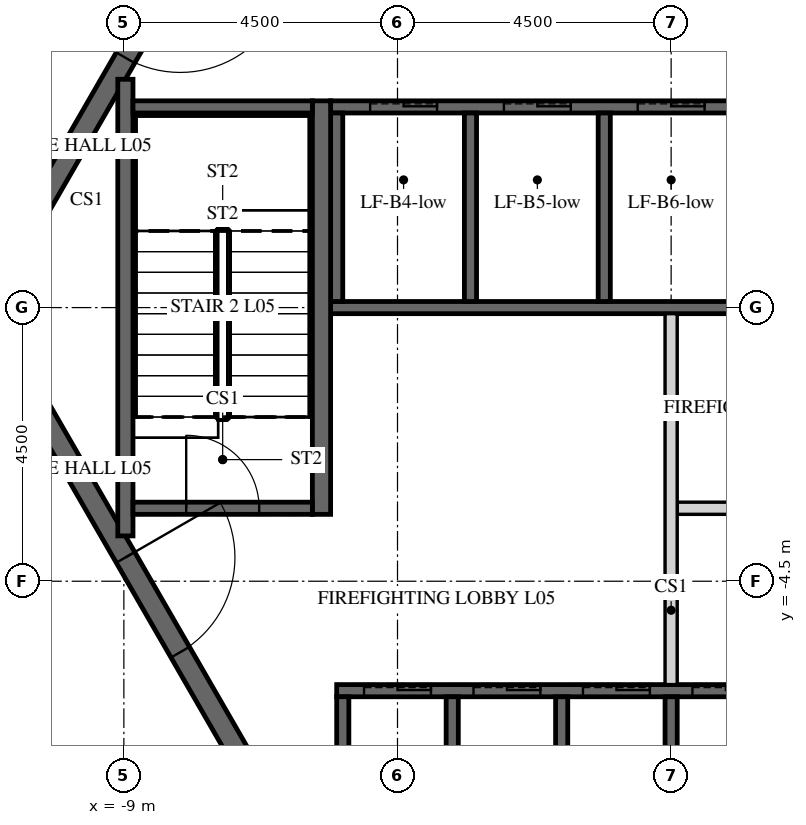
"""IFC4 building model, lengths in metres.
Left out: names, types, materials, properties, quantities, classifications, styles, units other than length and angle.
Written with IfcOpenShell. Run it as: python <this file> out.ifc"""

import sys

from ifc_helpers import new_model, si_unit, direction, frame, frame_2d, origin, place, context, subcontext, project, spatial, polyline, rectangle, outline, extrude, element, fill, save


model = new_model("IFC4")
c1 = context("Model", 3, precision=1e-05, world=origin(), true_north=direction((0.0, 1.0)))
c2 = subcontext(c1, "Body", "Model", "MODEL_VIEW")
j1 = project(units=[si_unit("LENGTHUNIT", "METRE"), si_unit("PLANEANGLEUNIT", "RADIAN")], contexts=[c1])
p1 = place(None, origin())
s1 = spatial("IfcSite", under=j1, at=p1, CompositionType="ELEMENT")
p2 = place(p1, origin())
s2 = spatial("IfcBuilding", under=s1, at=p2, CompositionType="ELEMENT")
p3 = place(p2, frame((0.0, 0.0, 31.5)))
s3 = spatial("IfcBuildingStorey", under=s2, at=p3, CompositionType="ELEMENT", Elevation=31.5)
p4 = place(p3, frame((-7.91, 13.7, -0.3), z_axis=(0.0, 0.0, 1.0), x_axis=(-0.499999880136, -0.866025472988, 0.0)))
e1 = element("IfcWall", 1, at=p4, inside=s3, PredefinedType="SHEAR", context=c2, shape_type="SweptSolid", body=[
    extrude(outline(polyline([(-0.173, -0.3), (15.993, -0.3), (15.646, 0.3), (0.173, 0.3), (-0.173, -0.3)])), origin(), (0.0, 0.0, 1.0), 6.15),
])
p5 = place(p4, frame((7.039, 0.0, 0.3)))
e2 = element("IfcOpeningElement", 2, at=p5, cuts=e1, PredefinedType="OPENING", context=c2, shape_type="SweptSolid", body=[
    extrude(rectangle(XDim=1.8, YDim=2.4, at=frame_2d((0.9, 1.2))), frame((0.0, 0.31, 0.0), z_axis=(0.0, -1.0, 0.0), x_axis=(1.0, 0.0, 0.0)), (0.0, 0.0, 1.0), 0.62),
])
p6 = place(p3, frame((-15.819, 0.0, -0.3), z_axis=(0.0, 0.0, 1.0), x_axis=(0.499999880136, -0.866025472988, 0.0)))
e3 = element("IfcWall", 3, at=p6, inside=s3, PredefinedType="SHEAR", context=c2, shape_type="SweptSolid", body=[
    extrude(outline(polyline([(-0.173, -0.3), (15.993, -0.3), (15.646, 0.3), (0.173, 0.3), (-0.173, -0.3)])), origin(), (0.0, 0.0, 1.0), 6.15),
])
p7 = place(p6, frame((6.981, 0.0, 0.3)))
e4 = element("IfcOpeningElement", 4, at=p7, cuts=e3, PredefinedType="OPENING", context=c2, shape_type="SweptSolid", body=[
    extrude(rectangle(XDim=1.8, YDim=2.4, at=frame_2d((0.9, 1.2))), frame((0.0, 0.31, 0.0), z_axis=(0.0, -1.0, 0.0), x_axis=(1.0, 0.0, 0.0)), (0.0, 0.0, 1.0), 0.62),
])
p8 = place(p3, frame((-5.673, 9.825, -0.3), z_axis=(0.0, 0.0, 1.0), x_axis=(-0.499995046907, -0.866028263435, 0.0)))
e5 = element("IfcWall", 5, at=p8, inside=s3, PredefinedType="SHEAR", context=c2, shape_type="SweptSolid", body=[
    extrude(outline(polyline([(-0.101, -0.175), (11.446, -0.175), (11.244, 0.175), (0.101, 0.175), (-0.101, -0.175)])), origin(), (0.0, 0.0, 1.0), 6.15),
])
p9 = place(p8, frame((4.801, 0.0, 0.3)))
e6 = element("IfcOpeningElement", 6, at=p9, cuts=e5, PredefinedType="OPENING", context=c2, shape_type="SweptSolid", body=[
    extrude(rectangle(XDim=1.8, YDim=2.4, at=frame_2d((0.9, 1.2))), frame((0.0, 0.185, 0.0), z_axis=(0.0, -1.0, 0.0), x_axis=(1.0, 0.0, 0.0)), (0.0, 0.0, 1.0), 0.37),
])
p10 = place(p3, frame((-11.345, 0.0, -0.3), z_axis=(0.0, 0.0, 1.0), x_axis=(0.499995046907, -0.866028263435, 0.0)))
e7 = element("IfcWall", 7, at=p10, inside=s3, PredefinedType="SHEAR", context=c2, shape_type="SweptSolid", body=[
    extrude(outline(polyline([(-0.101, -0.175), (11.446, -0.175), (11.244, 0.175), (0.101, 0.175), (-0.101, -0.175)])), origin(), (0.0, 0.0, 1.0), 6.15),
])
p11 = place(p10, frame((4.744, 0.0, 0.3)))
e8 = element("IfcOpeningElement", 8, at=p11, cuts=e7, PredefinedType="OPENING", context=c2, shape_type="SweptSolid", body=[
    extrude(rectangle(XDim=1.8, YDim=2.4, at=frame_2d((0.9, 1.2))), frame((0.0, 0.185, 0.0), z_axis=(0.0, -1.0, 0.0), x_axis=(1.0, 0.0, 0.0)), (0.0, 0.0, 1.0), 0.37),
])
p12 = place(p3, frame((-5.6, 3.3, -0.25), z_axis=(0.0, 0.0, 1.0), x_axis=(1.0, 0.0, 0.0)))
e9 = element("IfcWall", 9, at=p12, inside=s3, PredefinedType="SHEAR", context=c2, shape_type="SweptSolid", body=[
    extrude(rectangle(XDim=11.2, YDim=0.2, at=frame_2d((5.6, 0.0))), origin(), (0.0, 0.0, 1.0), 6.0),
])
p13 = place(p12, frame((0.65, 0.0, 0.25)))
e10 = element("IfcOpeningElement", 10, at=p13, cuts=e9, PredefinedType="OPENING", context=c2, shape_type="SweptSolid", body=[
    extrude(rectangle(XDim=1.1, YDim=2.1, at=frame_2d((0.55, 1.05))), frame((0.0, 0.11, 0.0), z_axis=(0.0, -1.0, 0.0), x_axis=(1.0, 0.0, 0.0)), (0.0, 0.0, 1.0), 0.22),
])
p14 = place(p12, frame((2.85, 0.0, 0.25)))
e11 = element("IfcOpeningElement", 11, at=p14, cuts=e9, PredefinedType="OPENING", context=c2, shape_type="SweptSolid", body=[
    extrude(rectangle(XDim=1.1, YDim=2.1, at=frame_2d((0.55, 1.05))), frame((0.0, 0.11, 0.0), z_axis=(0.0, -1.0, 0.0), x_axis=(1.0, 0.0, 0.0)), (0.0, 0.0, 1.0), 0.22),
])
p15 = place(p12, frame((5.05, 0.0, 0.25)))
e12 = element("IfcOpeningElement", 12, at=p15, cuts=e9, PredefinedType="OPENING", context=c2, shape_type="SweptSolid", body=[
    extrude(rectangle(XDim=1.1, YDim=2.1, at=frame_2d((0.55, 1.05))), frame((0.0, 0.11, 0.0), z_axis=(0.0, -1.0, 0.0), x_axis=(1.0, 0.0, 0.0)), (0.0, 0.0, 1.0), 0.22),
])
p16 = place(p12, frame((7.25, 0.0, 0.25)))
e13 = element("IfcOpeningElement", 13, at=p16, cuts=e9, PredefinedType="OPENING", context=c2, shape_type="SweptSolid", body=[
    extrude(rectangle(XDim=1.1, YDim=2.1, at=frame_2d((0.55, 1.05))), frame((0.0, 0.11, 0.0), z_axis=(0.0, -1.0, 0.0), x_axis=(1.0, 0.0, 0.0)), (0.0, 0.0, 1.0), 0.22),
])
p17 = place(p12, frame((9.45, 0.0, 0.25)))
e14 = element("IfcOpeningElement", 14, at=p17, cuts=e9, PredefinedType="OPENING", context=c2, shape_type="SweptSolid", body=[
    extrude(rectangle(XDim=1.1, YDim=2.1, at=frame_2d((0.55, 1.05))), frame((0.0, 0.11, 0.0), z_axis=(0.0, -1.0, 0.0), x_axis=(1.0, 0.0, 0.0)), (0.0, 0.0, 1.0), 0.22),
])
p18 = place(p3, frame((-5.6, 0.0, -0.25), z_axis=(0.0, 0.0, 1.0), x_axis=(1.0, 0.0, 0.0)))
e15 = element("IfcWall", 15, at=p18, inside=s3, PredefinedType="SHEAR", context=c2, shape_type="SweptSolid", body=[
    extrude(rectangle(XDim=11.2, YDim=0.2, at=frame_2d((5.6, 0.0))), origin(), (0.0, 0.0, 1.0), 6.0),
])
for number, where, z_axis, x_axis in (
    (16, (-5.5, 0.1, -0.25), (0.0, 0.0, 1.0), (0.0, 1.0, 0.0)),
    (17, (-3.3, 0.1, -0.25), (0.0, 0.0, 1.0), (0.0, 1.0, 0.0)),
    (18, (-1.1, 0.1, -0.25), (0.0, 0.0, 1.0), (0.0, 1.0, 0.0)),
):
    element("IfcWall", number, at=place(p3, frame(where, z_axis=z_axis, x_axis=x_axis)), inside=s3, PredefinedType="SHEAR", context=c2, shape_type="SweptSolid", body=[
        extrude(rectangle(XDim=3.1, YDim=0.2, at=frame_2d((1.55, 0.0))), origin(), (0.0, 0.0, 1.0), 6.0),
    ])
p19 = place(p3, frame((-5.5, -6.3, -0.25), z_axis=(0.0, 0.0, 1.0), x_axis=(1.0, 0.0, 0.0)))
e19 = element("IfcWall", 19, at=p19, inside=s3, PredefinedType="SHEAR", context=c2, shape_type="SweptSolid", body=[
    extrude(rectangle(XDim=9.2, YDim=0.2, at=frame_2d((4.6, 0.0))), origin(), (0.0, 0.0, 1.0), 6.0),
])
p20 = place(p19, frame((0.45, 0.0, 0.25)))
e20 = element("IfcOpeningElement", 20, at=p20, cuts=e19, PredefinedType="OPENING", context=c2, shape_type="SweptSolid", body=[
    extrude(rectangle(XDim=1.1, YDim=2.1, at=frame_2d((0.55, 1.05))), frame((0.0, 0.11, 0.0), z_axis=(0.0, -1.0, 0.0), x_axis=(1.0, 0.0, 0.0)), (0.0, 0.0, 1.0), 0.22),
])
p21 = place(p19, frame((2.25, 0.0, 0.25)))
e21 = element("IfcOpeningElement", 21, at=p21, cuts=e19, PredefinedType="OPENING", context=c2, shape_type="SweptSolid", body=[
    extrude(rectangle(XDim=1.1, YDim=2.1, at=frame_2d((0.55, 1.05))), frame((0.0, 0.11, 0.0), z_axis=(0.0, -1.0, 0.0), x_axis=(1.0, 0.0, 0.0)), (0.0, 0.0, 1.0), 0.22),
])
p22 = place(p19, frame((4.05, 0.0, 0.25)))
e22 = element("IfcOpeningElement", 22, at=p22, cuts=e19, PredefinedType="OPENING", context=c2, shape_type="SweptSolid", body=[
    extrude(rectangle(XDim=1.1, YDim=2.1, at=frame_2d((0.55, 1.05))), frame((0.0, 0.11, 0.0), z_axis=(0.0, -1.0, 0.0), x_axis=(1.0, 0.0, 0.0)), (0.0, 0.0, 1.0), 0.22),
])
p23 = place(p19, frame((5.85, 0.0, 0.25)))
e23 = element("IfcOpeningElement", 23, at=p23, cuts=e19, PredefinedType="OPENING", context=c2, shape_type="SweptSolid", body=[
    extrude(rectangle(XDim=1.1, YDim=2.1, at=frame_2d((0.55, 1.05))), frame((0.0, 0.11, 0.0), z_axis=(0.0, -1.0, 0.0), x_axis=(1.0, 0.0, 0.0)), (0.0, 0.0, 1.0), 0.22),
])
p24 = place(p19, frame((7.65, 0.0, 0.25)))
e24 = element("IfcOpeningElement", 24, at=p24, cuts=e19, PredefinedType="OPENING", context=c2, shape_type="SweptSolid", body=[
    extrude(rectangle(XDim=1.1, YDim=2.1, at=frame_2d((0.55, 1.05))), frame((0.0, 0.11, 0.0), z_axis=(0.0, -1.0, 0.0), x_axis=(1.0, 0.0, 0.0)), (0.0, 0.0, 1.0), 0.22),
])
for number, where, z_axis, x_axis in (
    (25, (-5.4, -9.3, -0.25), (0.0, 0.0, 1.0), (0.0, 1.0, 0.0)),
    (26, (-3.6, -9.3, -0.25), (0.0, 0.0, 1.0), (0.0, 1.0, 0.0)),
    (27, (-1.8, -9.3, -0.25), (0.0, 0.0, 1.0), (0.0, 1.0, 0.0)),
    (28, (0.0, -9.3, -0.25), (0.0, 0.0, 1.0), (0.0, 1.0, 0.0)),
):
    element("IfcWall", number, at=place(p3, frame(where, z_axis=z_axis, x_axis=x_axis)), inside=s3, PredefinedType="SHEAR", context=c2, shape_type="SweptSolid", body=[
        extrude(rectangle(XDim=2.9, YDim=0.2, at=frame_2d((1.45, 0.0))), origin(), (0.0, 0.0, 1.0), 6.0),
    ])
p25 = place(p3, frame((0.1, -3.3, 0.0), z_axis=(0.0, 0.0, 1.0), x_axis=(1.0, 0.0, 0.0)))
e29 = element("IfcWall", 29, at=p25, inside=s3, PredefinedType="PARTITIONING", context=c2, shape_type="SweptSolid", body=[
    extrude(rectangle(XDim=5.5, YDim=0.2, at=frame_2d((2.75, 0.0))), origin(), (0.0, 0.0, 1.0), 5.75),
])
p26 = place(p25, frame((2.3, 0.0, 0.0)))
e30 = element("IfcOpeningElement", 30, at=p26, cuts=e29, PredefinedType="OPENING", context=c2, shape_type="SweptSolid", body=[
    extrude(rectangle(XDim=0.9, YDim=2.1, at=frame_2d((0.45, 1.05))), frame((0.0, 0.11, 0.0), z_axis=(0.0, -1.0, 0.0), x_axis=(1.0, 0.0, 0.0)), (0.0, 0.0, 1.0), 0.22),
])
p27 = place(p3, frame((0.0, -6.2, 0.0), z_axis=(0.0, 0.0, 1.0), x_axis=(0.0, 1.0, 0.0)))
e31 = element("IfcWall", 31, at=p27, inside=s3, PredefinedType="PARTITIONING", context=c2, shape_type="SweptSolid", body=[
    extrude(rectangle(XDim=6.1, YDim=0.2, at=frame_2d((3.05, 0.0))), origin(), (0.0, 0.0, 1.0), 5.75),
])
p28 = place(p3, frame((-5.75, -3.4, -0.25), z_axis=(0.0, 0.0, 1.0), x_axis=(0.0, 1.0, 0.0)))
e32 = element("IfcWall", 32, at=p28, inside=s3, PredefinedType="SHEAR", context=c2, shape_type="SweptSolid", body=[
    extrude(rectangle(XDim=6.8, YDim=0.3, at=frame_2d((3.4, 0.0))), origin(), (0.0, 0.0, 1.0), 6.0),
])
p29 = place(p3, frame((-8.975, -3.755, -0.25), z_axis=(0.0, 0.0, 1.0), x_axis=(0.0, 1.0, 0.0)))
e33 = element("IfcWall", 33, at=p29, inside=s3, PredefinedType="SHEAR", context=c2, shape_type="SweptSolid", body=[
    extrude(rectangle(XDim=7.51, YDim=0.25, at=frame_2d((3.755, 0.0))), origin(), (0.0, 0.0, 1.0), 6.0),
])
p30 = place(p3, frame((-8.85, 3.3, -0.25), z_axis=(0.0, 0.0, 1.0), x_axis=(1.0, 0.0, 0.0)))
e34 = element("IfcWall", 34, at=p30, inside=s3, PredefinedType="SHEAR", context=c2, shape_type="SweptSolid", body=[
    extrude(rectangle(XDim=2.95, YDim=0.2, at=frame_2d((1.475, 0.0))), origin(), (0.0, 0.0, 1.0), 6.0),
])
p31 = place(p3, frame((-8.85, -3.3, -0.25), z_axis=(0.0, 0.0, 1.0), x_axis=(1.0, 0.0, 0.0)))
e35 = element("IfcWall", 35, at=p31, inside=s3, PredefinedType="SHEAR", context=c2, shape_type="SweptSolid", body=[
    extrude(rectangle(XDim=2.95, YDim=0.2, at=frame_2d((1.475, 0.0))), origin(), (0.0, 0.0, 1.0), 6.0),
])
p32 = place(p31, frame((0.875, 0.0, 0.25)))
e36 = element("IfcOpeningElement", 36, at=p32, cuts=e35, PredefinedType="OPENING", context=c2, shape_type="SweptSolid", body=[
    extrude(rectangle(XDim=1.2, YDim=2.4, at=frame_2d((0.6, 1.2))), frame((0.0, 0.11, 0.0), z_axis=(0.0, -1.0, 0.0), x_axis=(1.0, 0.0, 0.0)), (0.0, 0.0, 1.0), 0.22),
])
p33 = place(p9, origin())
e37 = element("IfcDoor", 37, at=p33, inside=s3, OperationType="DOUBLE_DOOR_SINGLE_SWING", PredefinedType="DOOR", context=c2, shape_type="SweptSolid", body=[
    extrude(rectangle(XDim=1.8, YDim=2.4, at=frame_2d((0.9, 1.2))), frame((0.0, 0.025, 0.0), z_axis=(0.0, -1.0, 0.0), x_axis=(1.0, 0.0, 0.0)), (0.0, 0.0, 1.0), 0.05),
])
fill(e6, e37)
p34 = place(p11, origin())
e38 = element("IfcDoor", 38, at=p34, inside=s3, OperationType="DOUBLE_DOOR_SINGLE_SWING", PredefinedType="DOOR", context=c2, shape_type="SweptSolid", body=[
    extrude(rectangle(XDim=1.8, YDim=2.4, at=frame_2d((0.9, 1.2))), frame((0.0, 0.025, 0.0), z_axis=(0.0, -1.0, 0.0), x_axis=(1.0, 0.0, 0.0)), (0.0, 0.0, 1.0), 0.05),
])
fill(e8, e38)
p35 = place(p32, origin())
e39 = element("IfcDoor", 39, at=p35, inside=s3, OperationType="SINGLE_SWING_LEFT", PredefinedType="DOOR", context=c2, shape_type="SweptSolid", body=[
    extrude(rectangle(XDim=1.2, YDim=2.4, at=frame_2d((0.6, 1.2))), frame((0.0, 0.025, 0.0), z_axis=(0.0, -1.0, 0.0), x_axis=(1.0, 0.0, 0.0)), (0.0, 0.0, 1.0), 0.05),
])
fill(e36, e39)
p36 = place(p13, origin())
e40 = element("IfcDoor", 40, at=p36, inside=s3, OperationType="SLIDING_TO_LEFT", PredefinedType="DOOR", context=c2, shape_type="SweptSolid", body=[
    extrude(rectangle(XDim=1.1, YDim=2.1, at=frame_2d((0.55, 1.05))), frame((0.0, 0.025, 0.0), z_axis=(0.0, -1.0, 0.0), x_axis=(1.0, 0.0, 0.0)), (0.0, 0.0, 1.0), 0.05),
])
fill(e10, e40)
p37 = place(p14, origin())
e41 = element("IfcDoor", 41, at=p37, inside=s3, OperationType="SLIDING_TO_LEFT", PredefinedType="DOOR", context=c2, shape_type="SweptSolid", body=[
    extrude(rectangle(XDim=1.1, YDim=2.1, at=frame_2d((0.55, 1.05))), frame((0.0, 0.025, 0.0), z_axis=(0.0, -1.0, 0.0), x_axis=(1.0, 0.0, 0.0)), (0.0, 0.0, 1.0), 0.05),
])
fill(e11, e41)
p38 = place(p15, origin())
e42 = element("IfcDoor", 42, at=p38, inside=s3, OperationType="SLIDING_TO_LEFT", PredefinedType="DOOR", context=c2, shape_type="SweptSolid", body=[
    extrude(rectangle(XDim=1.1, YDim=2.1, at=frame_2d((0.55, 1.05))), frame((0.0, 0.025, 0.0), z_axis=(0.0, -1.0, 0.0), x_axis=(1.0, 0.0, 0.0)), (0.0, 0.0, 1.0), 0.05),
])
fill(e12, e42)
p39 = place(p20, origin())
e43 = element("IfcDoor", 43, at=p39, inside=s3, OperationType="SLIDING_TO_LEFT", PredefinedType="DOOR", context=c2, shape_type="SweptSolid", body=[
    extrude(rectangle(XDim=1.1, YDim=2.1, at=frame_2d((0.55, 1.05))), frame((0.0, 0.025, 0.0), z_axis=(0.0, -1.0, 0.0), x_axis=(1.0, 0.0, 0.0)), (0.0, 0.0, 1.0), 0.05),
])
fill(e20, e43)
p40 = place(p21, origin())
e44 = element("IfcDoor", 44, at=p40, inside=s3, OperationType="SLIDING_TO_LEFT", PredefinedType="DOOR", context=c2, shape_type="SweptSolid", body=[
    extrude(rectangle(XDim=1.1, YDim=2.1, at=frame_2d((0.55, 1.05))), frame((0.0, 0.025, 0.0), z_axis=(0.0, -1.0, 0.0), x_axis=(1.0, 0.0, 0.0)), (0.0, 0.0, 1.0), 0.05),
])
fill(e21, e44)
p41 = place(p22, origin())
e45 = element("IfcDoor", 45, at=p41, inside=s3, OperationType="SLIDING_TO_LEFT", PredefinedType="DOOR", context=c2, shape_type="SweptSolid", body=[
    extrude(rectangle(XDim=1.1, YDim=2.1, at=frame_2d((0.55, 1.05))), frame((0.0, 0.025, 0.0), z_axis=(0.0, -1.0, 0.0), x_axis=(1.0, 0.0, 0.0)), (0.0, 0.0, 1.0), 0.05),
])
fill(e22, e45)
p42 = place(p23, origin())
e46 = element("IfcDoor", 46, at=p42, inside=s3, OperationType="SLIDING_TO_LEFT", PredefinedType="DOOR", context=c2, shape_type="SweptSolid", body=[
    extrude(rectangle(XDim=1.1, YDim=2.1, at=frame_2d((0.55, 1.05))), frame((0.0, 0.025, 0.0), z_axis=(0.0, -1.0, 0.0), x_axis=(1.0, 0.0, 0.0)), (0.0, 0.0, 1.0), 0.05),
])
fill(e23, e46)
save(model, sys.argv[1])
